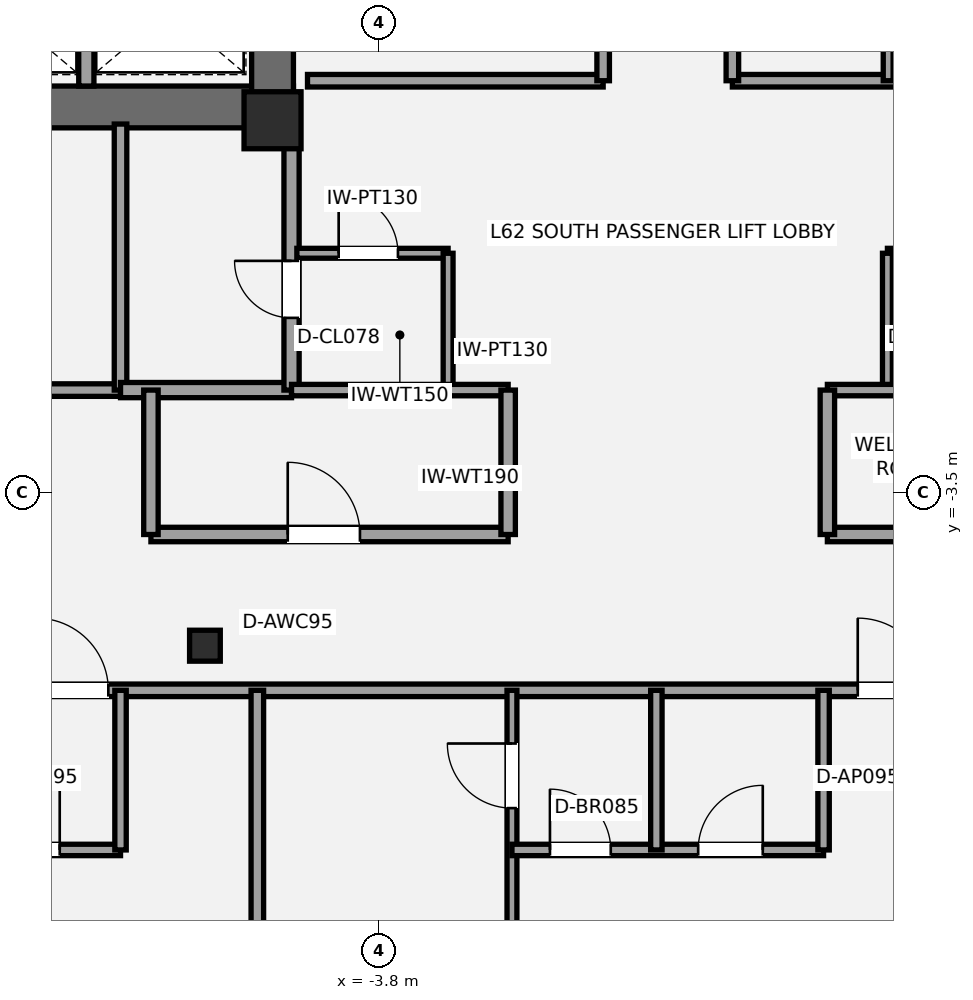
"""IFC4 building model, lengths in metres.
Left out: names, types, materials, properties, quantities, classifications, styles, units other than length and angle.
Written with IfcOpenShell. Run it as: python <this file> out.ifc"""

import sys

from ifc_helpers import new_model, si_unit, direction, frame, frame_2d, origin, origin_2d, place, context, subcontext, project, spatial, rectangle, i_section, extrude, element, fill, save


model = new_model("IFC4")
c1 = context("Model", 3, precision=1e-05, world=origin(), true_north=direction((0.0, 1.0)))
c2 = subcontext(c1, "Body", "Model", "MODEL_VIEW")
j1 = project(units=[si_unit("LENGTHUNIT", "METRE"), si_unit("PLANEANGLEUNIT", "RADIAN")], contexts=[c1])
p1 = place(None, origin())
s1 = spatial("IfcSite", under=j1, at=p1, CompositionType="ELEMENT")
p2 = place(p1, origin())
s2 = spatial("IfcBuilding", under=s1, at=p2, CompositionType="ELEMENT")
p3 = place(p2, frame((0.0, 0.0, 222.6)))
s3 = spatial("IfcBuildingStorey", under=s2, at=p3, CompositionType="ELEMENT", Elevation=222.6)
p4 = place(p3, frame((-4.925, 1.575, 0.0), z_axis=(0.0, 0.0, 1.0), x_axis=(-1.0, 0.0, 0.0)))
e1 = element("IfcWall", 1, at=p4, inside=s3, PredefinedType="SHEAR", context=c2, shape_type="SweptSolid", body=[
    extrude(rectangle(XDim=8.775, YDim=0.55, at=frame_2d((4.387, 0.0))), origin(), (0.0, 0.0, 1.0), 3.15),
])
p5 = place(p4, frame((5.375, 0.0, 0.0)))
e2 = element("IfcOpeningElement", 2, at=p5, cuts=e1, PredefinedType="OPENING", context=c2, shape_type="SweptSolid", body=[
    extrude(rectangle(XDim=1.05, YDim=2.15, at=frame_2d((0.525, 1.075))), frame((0.0, 0.285, 0.0), z_axis=(0.0, -1.0, 0.0), x_axis=(1.0, 0.0, 0.0)), (0.0, 0.0, 1.0), 0.57),
])
p6 = place(p4, frame((3.705, 0.0, 0.0)))
e3 = element("IfcOpeningElement", 3, at=p6, cuts=e1, PredefinedType="OPENING", context=c2, shape_type="SweptSolid", body=[
    extrude(rectangle(XDim=1.1, YDim=2.2, at=frame_2d((0.55, 1.1))), frame((0.0, 0.285, 0.0), z_axis=(0.0, -1.0, 0.0), x_axis=(1.0, 0.0, 0.0)), (0.0, 0.0, 1.0), 0.57),
])
p7 = place(p3, frame((-5.2, 1.3, 0.0), z_axis=(0.0, 0.0, 1.0), x_axis=(0.0, 1.0, 0.0)))
e4 = element("IfcWall", 4, at=p7, inside=s3, PredefinedType="SHEAR", context=c2, shape_type="SweptSolid", body=[
    extrude(rectangle(XDim=2.5, YDim=0.55, at=frame_2d((1.25, 0.0))), origin(), (0.0, 0.0, 1.0), 3.15),
])
p8 = place(p3, frame((-5.2, 1.4, 0.0), z_axis=(0.0, 0.0, 1.0), x_axis=(1.0, 0.0, 0.0)))
e5 = element("IfcColumn", 5, at=p8, inside=s3, PredefinedType="PILASTER", context=c2, shape_type="SweptSolid", body=[
    extrude(rectangle(XDim=0.75, YDim=0.75, at=origin_2d()), origin(), (0.0, 0.0, 1.0), 3.15),
])
p9 = place(p3, frame((-6.09, -5.513, 0.0), z_axis=(0.0, 0.0, 1.0), x_axis=(1.0, 0.0, 0.0)))
e6 = element("IfcColumn", 6, at=p9, inside=s3, PredefinedType="COLUMN", context=c2, shape_type="SweptSolid", body=[
    extrude(i_section(OverallWidth=0.404, OverallDepth=0.407, WebThickness=0.027, FlangeThickness=0.044, at=origin_2d()), origin(), (0.0, 0.0, 1.0), 3.15),
])
p10 = place(p3, frame((-13.45, -2.15, 0.0), z_axis=(0.0, 0.0, 1.0), x_axis=(1.0, 0.0, 0.0)))
e7 = element("IfcWall", 7, at=p10, inside=s3, PredefinedType="PARTITIONING", context=c2, shape_type="SweptSolid", body=[
    extrude(rectangle(XDim=6.25, YDim=0.165, at=frame_2d((3.125, 0.0))), origin(), (0.0, 0.0, 1.0), 2.423),
])
p11 = place(p3, frame((-7.2, -2.15, 0.0), z_axis=(0.0, 0.0, 1.0), x_axis=(0.0, 1.0, 0.0)))
e8 = element("IfcWall", 8, at=p11, inside=s3, PredefinedType="PARTITIONING", context=c2, shape_type="SweptSolid", body=[
    extrude(rectangle(XDim=3.5, YDim=0.165, at=frame_2d((1.75, 0.0))), origin(), (0.0, 0.0, 1.0), 2.423),
])
p12 = place(p3, frame((-7.2, -2.15, 0.0), z_axis=(0.0, 0.0, 1.0), x_axis=(1.0, 0.0, 0.0)))
e9 = element("IfcWall", 9, at=p12, inside=s3, PredefinedType="SOLIDWALL", context=c2, shape_type="SweptSolid", body=[
    extrude(rectangle(XDim=2.25, YDim=0.2, at=frame_2d((1.125, 0.0))), origin(), (0.0, 0.0, 1.0), 2.97),
])
p13 = place(p3, frame((-4.95, -2.15, 0.0), z_axis=(0.0, 0.0, 1.0), x_axis=(0.0, 1.0, 0.0)))
e10 = element("IfcWall", 10, at=p13, inside=s3, PredefinedType="SOLIDWALL", context=c2, shape_type="SweptSolid", body=[
    extrude(rectangle(XDim=3.5, YDim=0.2, at=frame_2d((1.75, 0.0))), origin(), (0.0, 0.0, 1.0), 2.423),
])
p14 = place(p13, frame((0.95, 0.0, 0.0)))
e11 = element("IfcOpeningElement", 11, at=p14, cuts=e10, PredefinedType="OPENING", context=c2, shape_type="SweptSolid", body=[
    extrude(rectangle(XDim=0.75, YDim=2.1, at=frame_2d((0.375, 1.05))), frame((0.0, 0.11, 0.0), z_axis=(0.0, -1.0, 0.0), x_axis=(1.0, 0.0, 0.0)), (0.0, 0.0, 1.0), 0.22),
])
p15 = place(p3, frame((-4.88, -0.35, 0.0), z_axis=(0.0, 0.0, 1.0), x_axis=(1.0, 0.0, 0.0)))
e12 = element("IfcWall", 12, at=p15, inside=s3, PredefinedType="PARTITIONING", context=c2, shape_type="SweptSolid", body=[
    extrude(rectangle(XDim=1.99, YDim=0.13, at=frame_2d((0.995, 0.0))), origin(), (0.0, 0.0, 1.0), 2.97),
])
p16 = place(p15, frame((0.55, 0.0, 0.0)))
e13 = element("IfcOpeningElement", 13, at=p16, cuts=e12, PredefinedType="OPENING", context=c2, shape_type="SweptSolid", body=[
    extrude(rectangle(XDim=0.78, YDim=2.1, at=frame_2d((0.39, 1.05))), frame((0.0, 0.075, 0.0), z_axis=(0.0, -1.0, 0.0), x_axis=(1.0, 0.0, 0.0)), (0.0, 0.0, 1.0), 0.15),
])
p17 = place(p3, frame((-2.89, -2.15, 0.0), z_axis=(0.0, 0.0, 1.0), x_axis=(0.0, 1.0, 0.0)))
e14 = element("IfcWall", 14, at=p17, inside=s3, PredefinedType="PARTITIONING", context=c2, shape_type="SweptSolid", body=[
    extrude(rectangle(XDim=1.8, YDim=0.13, at=frame_2d((0.9, 0.0))), origin(), (0.0, 0.0, 1.0), 2.423),
])
p18 = place(p3, frame((2.89, -0.35, 0.0), z_axis=(0.0, 0.0, 1.0), x_axis=(1.0, 0.0, 0.0)))
e15 = element("IfcWall", 15, at=p18, inside=s3, PredefinedType="PARTITIONING", context=c2, shape_type="SweptSolid", body=[
    extrude(rectangle(XDim=1.99, YDim=0.13, at=frame_2d((0.995, 0.0))), origin(), (0.0, 0.0, 1.0), 2.423),
])
p19 = place(p18, frame((0.55, 0.0, 0.0)))
e16 = element("IfcOpeningElement", 16, at=p19, cuts=e15, PredefinedType="OPENING", context=c2, shape_type="SweptSolid", body=[
    extrude(rectangle(XDim=0.78, YDim=2.1, at=frame_2d((0.39, 1.05))), frame((0.0, 0.075, 0.0), z_axis=(0.0, -1.0, 0.0), x_axis=(1.0, 0.0, 0.0)), (0.0, 0.0, 1.0), 0.15),
])
p20 = place(p3, frame((2.89, -2.15, 0.0), z_axis=(0.0, 0.0, 1.0), x_axis=(0.0, 1.0, 0.0)))
e17 = element("IfcWall", 17, at=p20, inside=s3, PredefinedType="PARTITIONING", context=c2, shape_type="SweptSolid", body=[
    extrude(rectangle(XDim=1.8, YDim=0.13, at=frame_2d((0.9, 0.0))), origin(), (0.0, 0.0, 1.0), 2.97),
])
p21 = place(p3, frame((-7.65, 1.85, 0.0), z_axis=(0.0, 0.0, 1.0), x_axis=(0.0, 1.0, 0.0)))
e18 = element("IfcWall", 18, at=p21, inside=s3, PredefinedType="SOLIDWALL", context=c2, shape_type="SweptSolid", body=[
    extrude(rectangle(XDim=1.93, YDim=0.2, at=frame_2d((0.965, 0.0))), origin(), (0.0, 0.0, 1.0), 2.97),
])
p22 = place(p3, frame((-4.74, 1.92, 0.0), z_axis=(0.0, 0.0, 1.0), x_axis=(1.0, 0.0, 0.0)))
e19 = element("IfcWall", 19, at=p22, inside=s3, PredefinedType="PARTITIONING", context=c2, shape_type="SweptSolid", body=[
    extrude(rectangle(XDim=3.89, YDim=0.165, at=frame_2d((1.945, 0.0))), origin(), (0.0, 0.0, 1.0), 2.11),
])
p23 = place(p3, frame((-0.85, 1.92, 0.0), z_axis=(0.0, 0.0, 1.0), x_axis=(0.0, 1.0, 0.0)))
e20 = element("IfcWall", 20, at=p23, inside=s3, PredefinedType="PARTITIONING", context=c2, shape_type="SweptSolid", body=[
    extrude(rectangle(XDim=1.82, YDim=0.165, at=frame_2d((0.91, 0.0))), origin(), (0.0, 0.0, 1.0), 2.97),
])
p24 = place(p3, frame((0.85, 1.92, 0.0), z_axis=(0.0, 0.0, 1.0), x_axis=(1.0, 0.0, 0.0)))
e21 = element("IfcWall", 21, at=p24, inside=s3, PredefinedType="PARTITIONING", context=c2, shape_type="SweptSolid", body=[
    extrude(rectangle(XDim=3.89, YDim=0.165, at=frame_2d((1.945, 0.0))), origin(), (0.0, 0.0, 1.0), 2.11),
])
p25 = place(p3, frame((0.85, 1.92, 0.0), z_axis=(0.0, 0.0, 1.0), x_axis=(0.0, 1.0, 0.0)))
e22 = element("IfcWall", 22, at=p25, inside=s3, PredefinedType="PARTITIONING", context=c2, shape_type="SweptSolid", body=[
    extrude(rectangle(XDim=1.82, YDim=0.165, at=frame_2d((0.91, 0.0))), origin(), (0.0, 0.0, 1.0), 2.97),
])
p26 = place(p3, frame((2.9, 1.92, 0.0), z_axis=(0.0, 0.0, 1.0), x_axis=(0.0, 1.0, 0.0)))
e23 = element("IfcWall", 23, at=p26, inside=s3, PredefinedType="PARTITIONING", context=c2, shape_type="SweptSolid", body=[
    extrude(rectangle(XDim=1.82, YDim=0.13, at=frame_2d((0.91, 0.0))), origin(), (0.0, 0.0, 1.0), 2.97),
])
p27 = place(p3, frame((-6.8, -4.05, 0.0), z_axis=(0.0, 0.0, 1.0), x_axis=(1.0, 0.0, 0.0)))
e24 = element("IfcWall", 24, at=p27, inside=s3, PredefinedType="PLUMBINGWALL", context=c2, shape_type="SweptSolid", body=[
    extrude(rectangle(XDim=4.7, YDim=0.19, at=frame_2d((2.35, 0.0))), origin(), (0.0, 0.0, 1.0), 2.423),
])
p28 = place(p27, frame((1.8, 0.0, 0.0)))
e25 = element("IfcOpeningElement", 25, at=p28, cuts=e24, PredefinedType="OPENING", context=c2, shape_type="SweptSolid", body=[
    extrude(rectangle(XDim=0.95, YDim=2.15, at=frame_2d((0.475, 1.075))), frame((0.0, 0.105, 0.0), z_axis=(0.0, -1.0, 0.0), x_axis=(1.0, 0.0, 0.0)), (0.0, 0.0, 1.0), 0.21),
])
p29 = place(p3, frame((-4.95, -2.15, 0.0), z_axis=(0.0, 0.0, 1.0), x_axis=(1.0, 0.0, 0.0)))
e26 = element("IfcWall", 26, at=p29, inside=s3, PredefinedType="PLUMBINGWALL", context=c2, shape_type="SweptSolid", body=[
    extrude(rectangle(XDim=2.85, YDim=0.15, at=frame_2d((1.425, 0.0))), origin(), (0.0, 0.0, 1.0), 2.97),
])
for number, where, z_axis, x_axis in (
    (27, (-6.8, -4.05, 0.0), (0.0, 0.0, 1.0), (0.0, 1.0, 0.0)),
    (28, (-2.1, -4.05, 0.0), (0.0, 0.0, 1.0), (0.0, 1.0, 0.0)),
):
    element("IfcWall", number, at=place(p3, frame(where, z_axis=z_axis, x_axis=x_axis)), inside=s3, PredefinedType="PLUMBINGWALL", context=c2, shape_type="SweptSolid", body=[
        extrude(rectangle(XDim=1.9, YDim=0.19, at=frame_2d((0.95, 0.0))), origin(), (0.0, 0.0, 1.0), 2.423),
    ])
p30 = place(p3, frame((2.1, -4.05, 0.0), z_axis=(0.0, 0.0, 1.0), x_axis=(1.0, 0.0, 0.0)))
e29 = element("IfcWall", 29, at=p30, inside=s3, PredefinedType="PLUMBINGWALL", context=c2, shape_type="SweptSolid", body=[
    extrude(rectangle(XDim=11.35, YDim=0.19, at=frame_2d((5.675, 0.0))), origin(), (0.0, 0.0, 1.0), 2.357),
])
p31 = place(p30, frame((5.2, 0.0, 0.0)))
e30 = element("IfcOpeningElement", 30, at=p31, cuts=e29, PredefinedType="OPENING", context=c2, shape_type="SweptSolid", body=[
    extrude(rectangle(XDim=0.9, YDim=2.1, at=frame_2d((0.45, 1.05))), frame((0.0, 0.105, 0.0), z_axis=(0.0, -1.0, 0.0), x_axis=(1.0, 0.0, 0.0)), (0.0, 0.0, 1.0), 0.21),
])
p32 = place(p3, frame((2.1, -2.15, 0.0), z_axis=(0.0, 0.0, 1.0), x_axis=(1.0, 0.0, 0.0)))
e31 = element("IfcWall", 31, at=p32, inside=s3, PredefinedType="PLUMBINGWALL", context=c2, shape_type="SweptSolid", body=[
    extrude(rectangle(XDim=2.85, YDim=0.15, at=frame_2d((1.425, 0.0))), origin(), (0.0, 0.0, 1.0), 2.97),
])
p33 = place(p3, frame((2.1, -4.05, 0.0), z_axis=(0.0, 0.0, 1.0), x_axis=(0.0, 1.0, 0.0)))
e32 = element("IfcWall", 32, at=p33, inside=s3, PredefinedType="PLUMBINGWALL", context=c2, shape_type="SweptSolid", body=[
    extrude(rectangle(XDim=1.9, YDim=0.19, at=frame_2d((0.95, 0.0))), origin(), (0.0, 0.0, 1.0), 2.97),
])
p34 = place(p3, frame((-20.123, -6.1, 0.0), z_axis=(0.0, 0.0, 1.0), x_axis=(1.0, 0.0, 0.0)))
e33 = element("IfcWall", 33, at=p34, inside=s3, PredefinedType="PARTITIONING", context=c2, shape_type="SweptSolid", body=[
    extrude(rectangle(XDim=40.247, YDim=0.165, at=frame_2d((20.123, 0.0))), origin(), (0.0, 0.0, 1.0), 2.423),
])
p35 = place(p34, frame((1.275, 0.0, 0.0)))
e34 = element("IfcOpeningElement", 34, at=p35, cuts=e33, PredefinedType="OPENING", context=c2, shape_type="SweptSolid", body=[
    extrude(rectangle(XDim=1.0, YDim=2.15, at=frame_2d((0.5, 1.075))), frame((0.0, 0.093, 0.0), z_axis=(0.0, -1.0, 0.0), x_axis=(1.0, 0.0, 0.0)), (0.0, 0.0, 1.0), 0.185),
])
p36 = place(p34, frame((37.922, 0.0, 0.0)))
e35 = element("IfcOpeningElement", 35, at=p36, cuts=e33, PredefinedType="OPENING", context=c2, shape_type="SweptSolid", body=[
    extrude(rectangle(XDim=1.0, YDim=2.15, at=frame_2d((0.5, 1.075))), frame((0.0, 0.093, 0.0), z_axis=(0.0, -1.0, 0.0), x_axis=(1.0, 0.0, 0.0)), (0.0, 0.0, 1.0), 0.185),
])
p37 = place(p34, frame((11.813, 0.0, 0.0)))
e36 = element("IfcOpeningElement", 36, at=p37, cuts=e33, PredefinedType="OPENING", context=c2, shape_type="SweptSolid", body=[
    extrude(rectangle(XDim=0.95, YDim=2.15, at=frame_2d((0.475, 1.075))), frame((0.0, 0.093, 0.0), z_axis=(0.0, -1.0, 0.0), x_axis=(1.0, 0.0, 0.0)), (0.0, 0.0, 1.0), 0.185),
])
p38 = place(p34, frame((22.623, 0.0, 0.0)))
e37 = element("IfcOpeningElement", 37, at=p38, cuts=e33, PredefinedType="OPENING", context=c2, shape_type="SweptSolid", body=[
    extrude(rectangle(XDim=0.95, YDim=2.15, at=frame_2d((0.475, 1.075))), frame((0.0, 0.093, 0.0), z_axis=(0.0, -1.0, 0.0), x_axis=(1.0, 0.0, 0.0)), (0.0, 0.0, 1.0), 0.185),
])
p39 = place(p34, frame((33.423, 0.0, 0.0)))
e38 = element("IfcOpeningElement", 38, at=p39, cuts=e33, PredefinedType="OPENING", context=c2, shape_type="SweptSolid", body=[
    extrude(rectangle(XDim=0.95, YDim=2.15, at=frame_2d((0.475, 1.075))), frame((0.0, 0.093, 0.0), z_axis=(0.0, -1.0, 0.0), x_axis=(1.0, 0.0, 0.0)), (0.0, 0.0, 1.0), 0.185),
])
p40 = place(p3, frame((-5.4, -14.565, 0.0), z_axis=(0.0, 0.0, 1.0), x_axis=(0.0, 1.0, 0.0)))
e39 = element("IfcWall", 39, at=p40, inside=s3, PredefinedType="PARTITIONING", context=c2, shape_type="SweptSolid", body=[
    extrude(rectangle(XDim=8.465, YDim=0.165, at=frame_2d((4.232, 0.0))), origin(), (0.0, 0.0, 1.0), 2.423),
])
p41 = place(p3, frame((-11.3, -8.2, 0.0), z_axis=(0.0, 0.0, 1.0), x_axis=(1.0, 0.0, 0.0)))
e40 = element("IfcWall", 40, at=p41, inside=s3, PredefinedType="PLUMBINGWALL", context=c2, shape_type="SweptSolid", body=[
    extrude(rectangle(XDim=4.1, YDim=0.15, at=frame_2d((2.05, 0.0))), origin(), (0.0, 0.0, 1.0), 2.423),
])
p42 = place(p41, frame((0.5, 0.0, 0.0)))
e41 = element("IfcOpeningElement", 41, at=p42, cuts=e40, PredefinedType="OPENING", context=c2, shape_type="SweptSolid", body=[
    extrude(rectangle(XDim=0.8, YDim=2.1, at=frame_2d((0.4, 1.05))), frame((0.0, 0.085, 0.0), z_axis=(0.0, -1.0, 0.0), x_axis=(1.0, 0.0, 0.0)), (0.0, 0.0, 1.0), 0.17),
])
p43 = place(p41, frame((2.45, 0.0, 0.0)))
e42 = element("IfcOpeningElement", 42, at=p43, cuts=e40, PredefinedType="OPENING", context=c2, shape_type="SweptSolid", body=[
    extrude(rectangle(XDim=0.85, YDim=2.1, at=frame_2d((0.425, 1.05))), frame((0.0, 0.085, 0.0), z_axis=(0.0, -1.0, 0.0), x_axis=(1.0, 0.0, 0.0)), (0.0, 0.0, 1.0), 0.17),
])
p44 = place(p3, frame((-7.2, -8.2, 0.0), z_axis=(0.0, 0.0, 1.0), x_axis=(0.0, 1.0, 0.0)))
e43 = element("IfcWall", 43, at=p44, inside=s3, PredefinedType="PLUMBINGWALL", context=c2, shape_type="SweptSolid", body=[
    extrude(rectangle(XDim=2.1, YDim=0.15, at=frame_2d((1.05, 0.0))), origin(), (0.0, 0.0, 1.0), 2.423),
])
p45 = place(p3, frame((-2.05, -15.106, 0.0), z_axis=(0.0, 0.0, 1.0), x_axis=(0.0, 1.0, 0.0)))
e44 = element("IfcWall", 44, at=p45, inside=s3, PredefinedType="PARTITIONING", context=c2, shape_type="SweptSolid", body=[
    extrude(rectangle(XDim=9.006, YDim=0.13, at=frame_2d((4.503, 0.0))), origin(), (0.0, 0.0, 1.0), 2.423),
])
p46 = place(p45, frame((7.456, 0.0, 0.0)))
e45 = element("IfcOpeningElement", 45, at=p46, cuts=e44, PredefinedType="OPENING", context=c2, shape_type="SweptSolid", body=[
    extrude(rectangle(XDim=0.85, YDim=2.1, at=frame_2d((0.425, 1.05))), frame((0.0, 0.075, 0.0), z_axis=(0.0, -1.0, 0.0), x_axis=(1.0, 0.0, 0.0)), (0.0, 0.0, 1.0), 0.15),
])
p47 = place(p3, frame((-2.05, -8.2, 0.0), z_axis=(0.0, 0.0, 1.0), x_axis=(1.0, 0.0, 0.0)))
e46 = element("IfcWall", 46, at=p47, inside=s3, PredefinedType="PLUMBINGWALL", context=c2, shape_type="SweptSolid", body=[
    extrude(rectangle(XDim=4.1, YDim=0.15, at=frame_2d((2.05, 0.0))), origin(), (0.0, 0.0, 1.0), 2.423),
])
p48 = place(p47, frame((0.5, 0.0, 0.0)))
e47 = element("IfcOpeningElement", 47, at=p48, cuts=e46, PredefinedType="OPENING", context=c2, shape_type="SweptSolid", body=[
    extrude(rectangle(XDim=0.8, YDim=2.1, at=frame_2d((0.4, 1.05))), frame((0.0, 0.085, 0.0), z_axis=(0.0, -1.0, 0.0), x_axis=(1.0, 0.0, 0.0)), (0.0, 0.0, 1.0), 0.17),
])
p49 = place(p47, frame((2.45, 0.0, 0.0)))
e48 = element("IfcOpeningElement", 48, at=p49, cuts=e46, PredefinedType="OPENING", context=c2, shape_type="SweptSolid", body=[
    extrude(rectangle(XDim=0.85, YDim=2.1, at=frame_2d((0.425, 1.05))), frame((0.0, 0.085, 0.0), z_axis=(0.0, -1.0, 0.0), x_axis=(1.0, 0.0, 0.0)), (0.0, 0.0, 1.0), 0.17),
])
p50 = place(p3, frame((-0.15, -8.2, 0.0), z_axis=(0.0, 0.0, 1.0), x_axis=(0.0, 1.0, 0.0)))
e49 = element("IfcWall", 49, at=p50, inside=s3, PredefinedType="PLUMBINGWALL", context=c2, shape_type="SweptSolid", body=[
    extrude(rectangle(XDim=2.1, YDim=0.15, at=frame_2d((1.05, 0.0))), origin(), (0.0, 0.0, 1.0), 2.423),
])
p51 = place(p3, frame((2.05, -8.2, 0.0), z_axis=(0.0, 0.0, 1.0), x_axis=(0.0, 1.0, 0.0)))
e50 = element("IfcWall", 50, at=p51, inside=s3, PredefinedType="PLUMBINGWALL", context=c2, shape_type="SweptSolid", body=[
    extrude(rectangle(XDim=2.1, YDim=0.15, at=frame_2d((1.05, 0.0))), origin(), (0.0, 0.0, 1.0), 2.97),
])
p52 = place(p14, origin())
e51 = element("IfcDoor", 51, at=p52, inside=s3, OperationType="SINGLE_SWING_RIGHT", PredefinedType="DOOR", context=c2, shape_type="SweptSolid", body=[
    extrude(rectangle(XDim=0.75, YDim=2.1, at=frame_2d((0.375, 1.05))), frame((0.0, 0.025, 0.0), z_axis=(0.0, -1.0, 0.0), x_axis=(1.0, 0.0, 0.0)), (0.0, 0.0, 1.0), 0.05),
])
fill(e11, e51)
p53 = place(p16, origin())
e52 = element("IfcDoor", 52, at=p53, inside=s3, OperationType="SINGLE_SWING_LEFT", PredefinedType="DOOR", context=c2, shape_type="SweptSolid", body=[
    extrude(rectangle(XDim=0.78, YDim=2.1, at=frame_2d((0.39, 1.05))), frame((0.0, 0.025, 0.0), z_axis=(0.0, -1.0, 0.0), x_axis=(1.0, 0.0, 0.0)), (0.0, 0.0, 1.0), 0.05),
])
fill(e13, e52)
p54 = place(p28, origin())
e53 = element("IfcDoor", 53, at=p54, inside=s3, OperationType="SINGLE_SWING_LEFT", PredefinedType="DOOR", context=c2, shape_type="SweptSolid", body=[
    extrude(rectangle(XDim=0.95, YDim=2.15, at=frame_2d((0.475, 1.075))), frame((0.0, 0.025, 0.0), z_axis=(0.0, -1.0, 0.0), x_axis=(1.0, 0.0, 0.0)), (0.0, 0.0, 1.0), 0.05),
])
fill(e25, e53)
p55 = place(p43, origin())
e54 = element("IfcDoor", 54, at=p55, inside=s3, OperationType="SINGLE_SWING_RIGHT", PredefinedType="DOOR", context=c2, shape_type="SweptSolid", body=[
    extrude(rectangle(XDim=0.85, YDim=2.1, at=frame_2d((0.425, 1.05))), frame((0.0, 0.025, 0.0), z_axis=(0.0, -1.0, 0.0), x_axis=(1.0, 0.0, 0.0)), (0.0, 0.0, 1.0), 0.05),
])
fill(e42, e54)
p56 = place(p37, origin())
e55 = element("IfcDoor", 55, at=p56, inside=s3, OperationType="SINGLE_SWING_LEFT", PredefinedType="DOOR", context=c2, shape_type="SweptSolid", body=[
    extrude(rectangle(XDim=0.95, YDim=2.15, at=frame_2d((0.475, 1.075))), frame((0.0, 0.025, 0.0), z_axis=(0.0, -1.0, 0.0), x_axis=(1.0, 0.0, 0.0)), (0.0, 0.0, 1.0), 0.05),
])
fill(e36, e55)
p57 = place(p46, origin())
e56 = element("IfcDoor", 56, at=p57, inside=s3, OperationType="SINGLE_SWING_RIGHT", PredefinedType="DOOR", context=c2, shape_type="SweptSolid", body=[
    extrude(rectangle(XDim=0.85, YDim=2.1, at=frame_2d((0.425, 1.05))), frame((0.0, 0.025, 0.0), z_axis=(0.0, -1.0, 0.0), x_axis=(1.0, 0.0, 0.0)), (0.0, 0.0, 1.0), 0.05),
])
fill(e45, e56)
p58 = place(p48, origin())
e57 = element("IfcDoor", 57, at=p58, inside=s3, OperationType="SINGLE_SWING_LEFT", PredefinedType="DOOR", context=c2, shape_type="SweptSolid", body=[
    extrude(rectangle(XDim=0.8, YDim=2.1, at=frame_2d((0.4, 1.05))), frame((0.0, 0.025, 0.0), z_axis=(0.0, -1.0, 0.0), x_axis=(1.0, 0.0, 0.0)), (0.0, 0.0, 1.0), 0.05),
])
fill(e47, e57)
p59 = place(p49, origin())
e58 = element("IfcDoor", 58, at=p59, inside=s3, OperationType="SINGLE_SWING_RIGHT", PredefinedType="DOOR", context=c2, shape_type="SweptSolid", body=[
    extrude(rectangle(XDim=0.85, YDim=2.1, at=frame_2d((0.425, 1.05))), frame((0.0, 0.025, 0.0), z_axis=(0.0, -1.0, 0.0), x_axis=(1.0, 0.0, 0.0)), (0.0, 0.0, 1.0), 0.05),
])
fill(e48, e58)
p60 = place(p38, origin())
e59 = element("IfcDoor", 59, at=p60, inside=s3, OperationType="SINGLE_SWING_LEFT", PredefinedType="DOOR", context=c2, shape_type="SweptSolid", body=[
    extrude(rectangle(XDim=0.95, YDim=2.15, at=frame_2d((0.475, 1.075))), frame((0.0, 0.025, 0.0), z_axis=(0.0, -1.0, 0.0), x_axis=(1.0, 0.0, 0.0)), (0.0, 0.0, 1.0), 0.05),
])
fill(e37, e59)
save(model, sys.argv[1])
